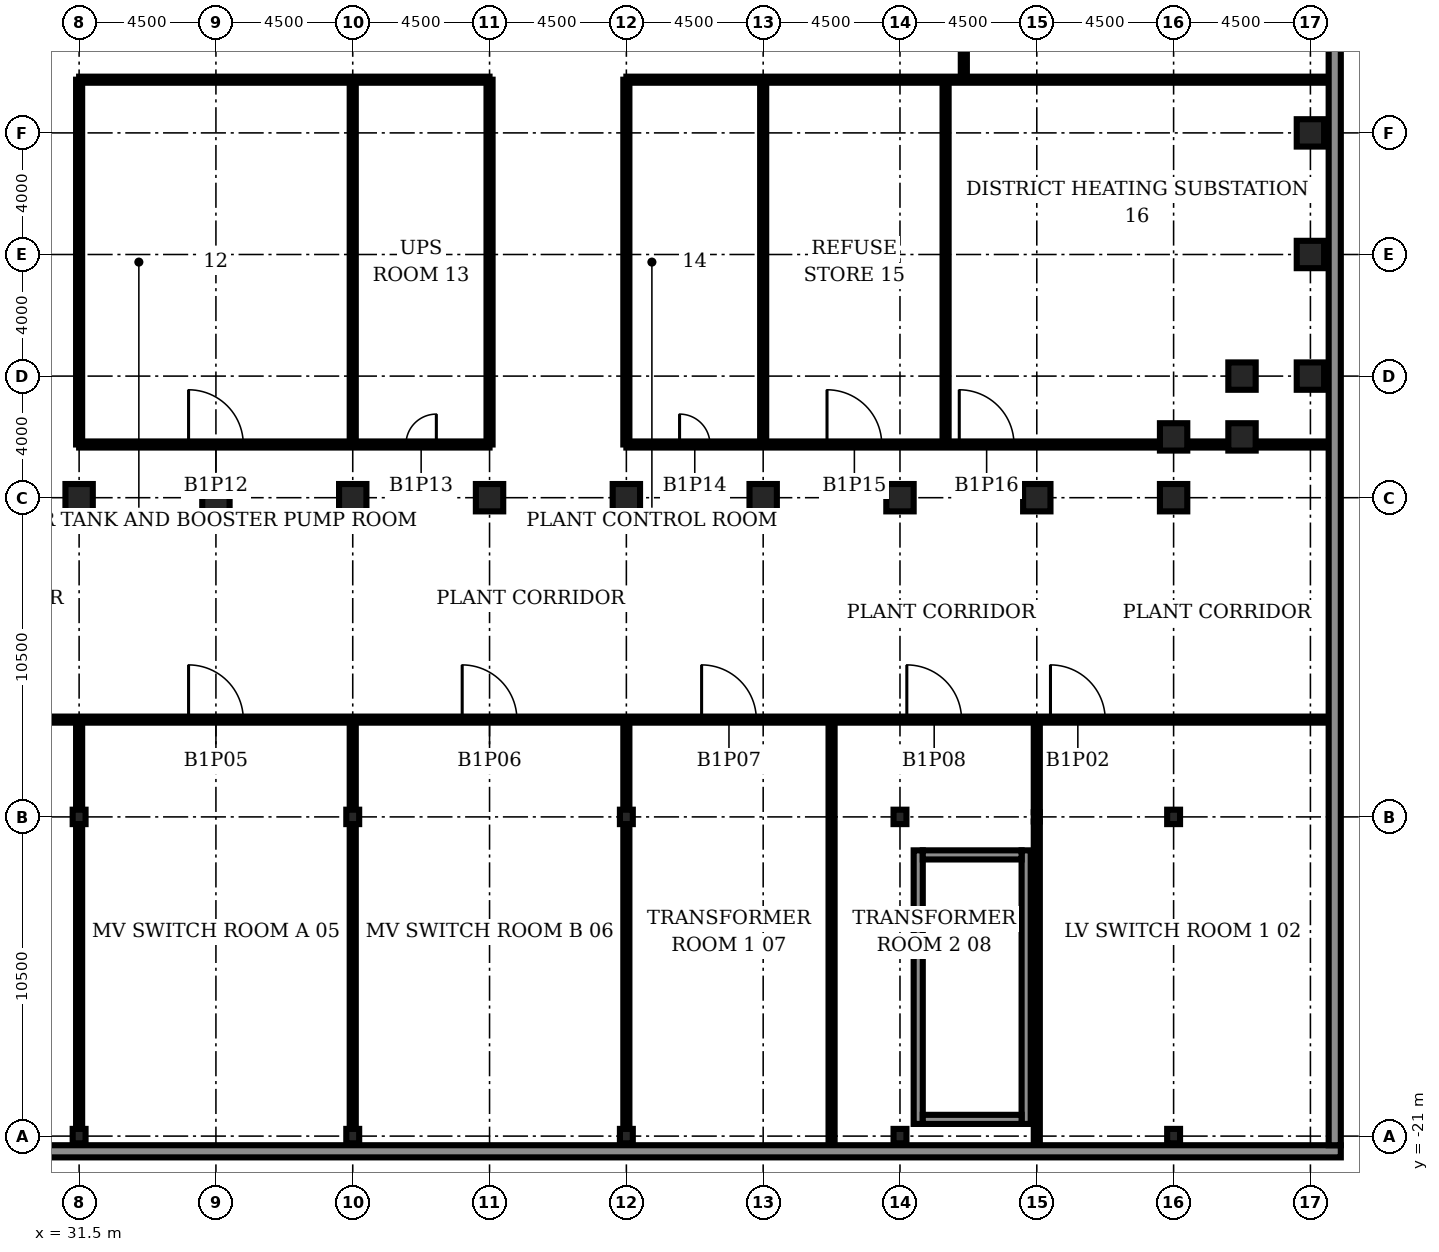
"""IFC4 building model, lengths in metres.
Left out: names, types, materials, properties, quantities, classifications, styles, units other than length and angle.
Written with IfcOpenShell. Run it as: python <this file> out.ifc"""

import sys

from ifc_helpers import new_model, si_unit, direction, frame, frame_2d, origin, origin_2d, place, context, subcontext, project, spatial, rectangle, hollow_rectangle, i_section, extrude, element, fill, save


model = new_model("IFC4")
c1 = context("Model", 3, precision=1e-05, world=origin(), true_north=direction((0.0, 1.0)))
c2 = subcontext(c1, "Body", "Model", "MODEL_VIEW")
j1 = project(units=[si_unit("LENGTHUNIT", "METRE"), si_unit("PLANEANGLEUNIT", "RADIAN")], contexts=[c1])
p1 = place(None, origin())
s1 = spatial("IfcSite", under=j1, at=p1, CompositionType="ELEMENT")
p2 = place(p1, origin())
s2 = spatial("IfcBuilding", under=s1, at=p2, CompositionType="ELEMENT")
p3 = place(p2, frame((0.0, 0.0, -6.0)))
s3 = spatial("IfcBuildingStorey", under=s2, at=p3, CompositionType="ELEMENT", Elevation=-6.0)
for number, where, z_axis, x_axis in (
    (1, (31.5, 0.0, 0.0), (0.0, 0.0, 1.0), (0.0, 1.0, 0.0)),
    (2, (36.0, 0.0, 0.0), (0.0, 0.0, 1.0), (0.0, 1.0, 0.0)),
    (3, (40.5, 0.0, 0.0), (0.0, 0.0, 1.0), (0.0, 1.0, 0.0)),
    (4, (45.0, 0.0, 0.0), (0.0, 0.0, 1.0), (0.0, 1.0, 0.0)),
    (5, (49.5, 0.0, 0.0), (0.0, 0.0, 1.0), (0.0, 1.0, 0.0)),
    (6, (54.0, 0.0, 0.0), (0.0, 0.0, 1.0), (0.0, 1.0, 0.0)),
    (7, (58.5, 0.0, 0.0), (0.0, 0.0, 1.0), (0.0, 1.0, 0.0)),
    (8, (63.0, 0.0, 0.0), (0.0, 0.0, 1.0), (0.0, 1.0, 0.0)),
    (9, (67.5, 0.0, 0.0), (0.0, 0.0, 1.0), (0.0, 1.0, 0.0)),
    (10, (67.5, 2.0, 0.0), (0.0, 0.0, 1.0), (0.0, 1.0, 0.0)),
    (11, (69.75, 2.0, 0.0), (0.0, 0.0, 1.0), (1.0, 0.0, 0.0)),
    (12, (69.75, 4.0, 0.0), (0.0, 0.0, 1.0), (1.0, 0.0, 0.0)),
    (13, (72.0, 4.0, 0.0), (0.0, 0.0, 1.0), (1.0, 0.0, 0.0)),
    (14, (72.0, 8.0, 0.0), (0.0, 0.0, 1.0), (1.0, 0.0, 0.0)),
    (15, (72.0, 12.0, 0.0), (0.0, 0.0, 1.0), (1.0, 0.0, 0.0)),
):
    element("IfcColumn", number, at=place(p3, frame(where, z_axis=z_axis, x_axis=x_axis)), inside=s3, PredefinedType="COLUMN", context=c2, shape_type="SweptSolid", body=[
        extrude(hollow_rectangle(XDim=0.9, YDim=0.9, WallThickness=0.12, at=origin_2d()), origin(), (0.0, 0.0, 1.0), 6.0),
    ])
for number, where, z_axis, x_axis in (
    (16, (31.5, -21.0, 0.0), (0.0, 0.0, 1.0), (1.0, 0.0, 0.0)),
    (17, (31.5, -10.5, 0.0), (0.0, 0.0, 1.0), (1.0, 0.0, 0.0)),
    (18, (40.5, -21.0, 0.0), (0.0, 0.0, 1.0), (1.0, 0.0, 0.0)),
    (19, (40.5, -10.5, 0.0), (0.0, 0.0, 1.0), (1.0, 0.0, 0.0)),
    (20, (49.5, -21.0, 0.0), (0.0, 0.0, 1.0), (1.0, 0.0, 0.0)),
    (21, (49.5, -10.5, 0.0), (0.0, 0.0, 1.0), (1.0, 0.0, 0.0)),
    (22, (58.5, -21.0, 0.0), (0.0, 0.0, 1.0), (1.0, 0.0, 0.0)),
    (23, (58.5, -10.5, 0.0), (0.0, 0.0, 1.0), (1.0, 0.0, 0.0)),
    (24, (67.5, -21.0, 0.0), (0.0, 0.0, 1.0), (1.0, 0.0, 0.0)),
    (25, (67.5, -10.5, 0.0), (0.0, 0.0, 1.0), (1.0, 0.0, 0.0)),
):
    element("IfcColumn", number, at=place(p3, frame(where, z_axis=z_axis, x_axis=x_axis)), inside=s3, PredefinedType="COLUMN", context=c2, shape_type="SweptSolid", body=[
        extrude(i_section(OverallWidth=0.424, OverallDepth=0.474, WebThickness=0.048, FlangeThickness=0.077, at=origin_2d()), origin(), (0.0, 0.0, 1.0), 6.0),
    ])
p4 = place(p3, frame((-0.59, -7.3, 0.0), z_axis=(0.0, 0.0, 1.0), x_axis=(1.0, 0.0, 0.0)))
e26 = element("IfcWall", 26, at=p4, inside=s3, PredefinedType="PARTITIONING", context=c2, shape_type="SweptSolid", body=[
    extrude(rectangle(XDim=73.18, YDim=0.2, at=frame_2d((36.59, 0.0))), origin(), (0.0, 0.0, 1.0), 5.7),
])
p5 = place(p4, frame((11.84, 0.0, 0.0)))
e27 = element("IfcOpeningElement", 27, at=p5, cuts=e26, PredefinedType="OPENING", context=c2, shape_type="SweptSolid", body=[
    extrude(rectangle(XDim=1.8, YDim=2.1, at=frame_2d((0.9, 1.05))), frame((0.0, 0.11, 0.0), z_axis=(0.0, -1.0, 0.0), x_axis=(1.0, 0.0, 0.0)), (0.0, 0.0, 1.0), 0.22),
])
p6 = place(p4, frame((64.04, 0.0, 0.0)))
e28 = element("IfcOpeningElement", 28, at=p6, cuts=e26, PredefinedType="OPENING", context=c2, shape_type="SweptSolid", body=[
    extrude(rectangle(XDim=1.8, YDim=2.1, at=frame_2d((0.9, 1.05))), frame((0.0, 0.11, 0.0), z_axis=(0.0, -1.0, 0.0), x_axis=(1.0, 0.0, 0.0)), (0.0, 0.0, 1.0), 0.22),
])
p7 = place(p4, frame((15.44, 0.0, 0.0)))
e29 = element("IfcOpeningElement", 29, at=p7, cuts=e26, PredefinedType="OPENING", context=c2, shape_type="SweptSolid", body=[
    extrude(rectangle(XDim=1.8, YDim=2.1, at=frame_2d((0.9, 1.05))), frame((0.0, 0.11, 0.0), z_axis=(0.0, -1.0, 0.0), x_axis=(1.0, 0.0, 0.0)), (0.0, 0.0, 1.0), 0.22),
])
p8 = place(p4, frame((19.04, 0.0, 0.0)))
e30 = element("IfcOpeningElement", 30, at=p8, cuts=e26, PredefinedType="OPENING", context=c2, shape_type="SweptSolid", body=[
    extrude(rectangle(XDim=1.8, YDim=2.1, at=frame_2d((0.9, 1.05))), frame((0.0, 0.11, 0.0), z_axis=(0.0, -1.0, 0.0), x_axis=(1.0, 0.0, 0.0)), (0.0, 0.0, 1.0), 0.22),
])
p9 = place(p4, frame((35.69, 0.0, 0.0)))
e31 = element("IfcOpeningElement", 31, at=p9, cuts=e26, PredefinedType="OPENING", context=c2, shape_type="SweptSolid", body=[
    extrude(rectangle(XDim=1.8, YDim=2.1, at=frame_2d((0.9, 1.05))), frame((0.0, 0.11, 0.0), z_axis=(0.0, -1.0, 0.0), x_axis=(1.0, 0.0, 0.0)), (0.0, 0.0, 1.0), 0.22),
])
p10 = place(p4, frame((44.69, 0.0, 0.0)))
e32 = element("IfcOpeningElement", 32, at=p10, cuts=e26, PredefinedType="OPENING", context=c2, shape_type="SweptSolid", body=[
    extrude(rectangle(XDim=1.8, YDim=2.1, at=frame_2d((0.9, 1.05))), frame((0.0, 0.11, 0.0), z_axis=(0.0, -1.0, 0.0), x_axis=(1.0, 0.0, 0.0)), (0.0, 0.0, 1.0), 0.22),
])
p11 = place(p4, frame((52.565, 0.0, 0.0)))
e33 = element("IfcOpeningElement", 33, at=p11, cuts=e26, PredefinedType="OPENING", context=c2, shape_type="SweptSolid", body=[
    extrude(rectangle(XDim=1.8, YDim=2.1, at=frame_2d((0.9, 1.05))), frame((0.0, 0.11, 0.0), z_axis=(0.0, -1.0, 0.0), x_axis=(1.0, 0.0, 0.0)), (0.0, 0.0, 1.0), 0.22),
])
p12 = place(p4, frame((59.315, 0.0, 0.0)))
e34 = element("IfcOpeningElement", 34, at=p12, cuts=e26, PredefinedType="OPENING", context=c2, shape_type="SweptSolid", body=[
    extrude(rectangle(XDim=1.8, YDim=2.1, at=frame_2d((0.9, 1.05))), frame((0.0, 0.11, 0.0), z_axis=(0.0, -1.0, 0.0), x_axis=(1.0, 0.0, 0.0)), (0.0, 0.0, 1.0), 0.22),
])
p13 = place(p3, frame((31.5, 1.75, 0.0), z_axis=(0.0, 0.0, 1.0), x_axis=(1.0, 0.0, 0.0)))
e35 = element("IfcWall", 35, at=p13, inside=s3, PredefinedType="PARTITIONING", context=c2, shape_type="SweptSolid", body=[
    extrude(rectangle(XDim=13.5, YDim=0.2, at=frame_2d((6.75, 0.0))), origin(), (0.0, 0.0, 1.0), 5.7),
])
p14 = place(p13, frame((3.6, 0.0, 0.0)))
e36 = element("IfcOpeningElement", 36, at=p14, cuts=e35, PredefinedType="OPENING", context=c2, shape_type="SweptSolid", body=[
    extrude(rectangle(XDim=1.8, YDim=2.1, at=frame_2d((0.9, 1.05))), frame((0.0, 0.11, 0.0), z_axis=(0.0, -1.0, 0.0), x_axis=(1.0, 0.0, 0.0)), (0.0, 0.0, 1.0), 0.22),
])
p15 = place(p13, frame((10.75, 0.0, 0.0)))
e37 = element("IfcOpeningElement", 37, at=p15, cuts=e35, PredefinedType="OPENING", context=c2, shape_type="SweptSolid", body=[
    extrude(rectangle(XDim=1.0, YDim=2.1, at=frame_2d((0.5, 1.05))), frame((0.0, 0.11, 0.0), z_axis=(0.0, -1.0, 0.0), x_axis=(1.0, 0.0, 0.0)), (0.0, 0.0, 1.0), 0.22),
])
p16 = place(p3, frame((49.5, 1.75, 0.0), z_axis=(0.0, 0.0, 1.0), x_axis=(1.0, 0.0, 0.0)))
e38 = element("IfcWall", 38, at=p16, inside=s3, PredefinedType="PARTITIONING", context=c2, shape_type="SweptSolid", body=[
    extrude(rectangle(XDim=23.09, YDim=0.2, at=frame_2d((11.545, 0.0))), origin(), (0.0, 0.0, 1.0), 5.7),
])
p17 = place(p16, frame((1.75, 0.0, 0.0)))
e39 = element("IfcOpeningElement", 39, at=p17, cuts=e38, PredefinedType="OPENING", context=c2, shape_type="SweptSolid", body=[
    extrude(rectangle(XDim=1.0, YDim=2.1, at=frame_2d((0.5, 1.05))), frame((0.0, 0.11, 0.0), z_axis=(0.0, -1.0, 0.0), x_axis=(1.0, 0.0, 0.0)), (0.0, 0.0, 1.0), 0.22),
])
p18 = place(p16, frame((6.6, 0.0, 0.0)))
e40 = element("IfcOpeningElement", 40, at=p18, cuts=e38, PredefinedType="OPENING", context=c2, shape_type="SweptSolid", body=[
    extrude(rectangle(XDim=1.8, YDim=2.1, at=frame_2d((0.9, 1.05))), frame((0.0, 0.11, 0.0), z_axis=(0.0, -1.0, 0.0), x_axis=(1.0, 0.0, 0.0)), (0.0, 0.0, 1.0), 0.22),
])
p19 = place(p16, frame((10.95, 0.0, 0.0)))
e41 = element("IfcOpeningElement", 41, at=p19, cuts=e38, PredefinedType="OPENING", context=c2, shape_type="SweptSolid", body=[
    extrude(rectangle(XDim=1.8, YDim=2.1, at=frame_2d((0.9, 1.05))), frame((0.0, 0.11, 0.0), z_axis=(0.0, -1.0, 0.0), x_axis=(1.0, 0.0, 0.0)), (0.0, 0.0, 1.0), 0.22),
])
p20 = place(p3, frame((31.5, 13.75, 0.0), z_axis=(0.0, 0.0, 1.0), x_axis=(1.0, 0.0, 0.0)))
e42 = element("IfcWall", 42, at=p20, inside=s3, PredefinedType="PARTITIONING", context=c2, shape_type="SweptSolid", body=[
    extrude(rectangle(XDim=13.5, YDim=0.2, at=frame_2d((6.75, 0.0))), origin(), (0.0, 0.0, 1.0), 5.7),
])
p21 = place(p3, frame((49.5, 13.75, 0.0), z_axis=(0.0, 0.0, 1.0), x_axis=(1.0, 0.0, 0.0)))
e43 = element("IfcWall", 43, at=p21, inside=s3, PredefinedType="PARTITIONING", context=c2, shape_type="SweptSolid", body=[
    extrude(rectangle(XDim=23.09, YDim=0.2, at=frame_2d((11.545, 0.0))), origin(), (0.0, 0.0, 1.0), 5.7),
])
p22 = place(p3, frame((31.5, -21.29, 0.0), z_axis=(0.0, 0.0, 1.0), x_axis=(0.0, 1.0, 0.0)))
e44 = element("IfcWall", 44, at=p22, inside=s3, PredefinedType="PARTITIONING", context=c2, shape_type="SweptSolid", body=[
    extrude(rectangle(XDim=13.99, YDim=0.2, at=frame_2d((6.995, 0.0))), origin(), (0.0, 0.0, 1.0), 4.984),
])
p23 = place(p3, frame((31.5, 1.75, 0.0), z_axis=(0.0, 0.0, 1.0), x_axis=(0.0, 1.0, 0.0)))
e45 = element("IfcWall", 45, at=p23, inside=s3, PredefinedType="PARTITIONING", context=c2, shape_type="SweptSolid", body=[
    extrude(rectangle(XDim=12.0, YDim=0.2, at=frame_2d((6.0, 0.0))), origin(), (0.0, 0.0, 1.0), 5.7),
])
p24 = place(p3, frame((40.5, -21.29, 0.0), z_axis=(0.0, 0.0, 1.0), x_axis=(0.0, 1.0, 0.0)))
e46 = element("IfcWall", 46, at=p24, inside=s3, PredefinedType="PARTITIONING", context=c2, shape_type="SweptSolid", body=[
    extrude(rectangle(XDim=13.99, YDim=0.2, at=frame_2d((6.995, 0.0))), origin(), (0.0, 0.0, 1.0), 4.984),
])
for number, where, z_axis, x_axis in (
    (47, (40.5, 1.75, 0.0), (0.0, 0.0, 1.0), (0.0, 1.0, 0.0)),
    (48, (45.0, 1.75, 0.0), (0.0, 0.0, 1.0), (0.0, 1.0, 0.0)),
):
    element("IfcWall", number, at=place(p3, frame(where, z_axis=z_axis, x_axis=x_axis)), inside=s3, PredefinedType="PARTITIONING", context=c2, shape_type="SweptSolid", body=[
        extrude(rectangle(XDim=12.0, YDim=0.2, at=frame_2d((6.0, 0.0))), origin(), (0.0, 0.0, 1.0), 5.7),
    ])
p25 = place(p3, frame((49.5, -21.29, 0.0), z_axis=(0.0, 0.0, 1.0), x_axis=(0.0, 1.0, 0.0)))
e49 = element("IfcWall", 49, at=p25, inside=s3, PredefinedType="PARTITIONING", context=c2, shape_type="SweptSolid", body=[
    extrude(rectangle(XDim=13.99, YDim=0.2, at=frame_2d((6.995, 0.0))), origin(), (0.0, 0.0, 1.0), 4.984),
])
for number, where, z_axis, x_axis in (
    (50, (49.5, 1.75, 0.0), (0.0, 0.0, 1.0), (0.0, 1.0, 0.0)),
    (51, (54.0, 1.75, 0.0), (0.0, 0.0, 1.0), (0.0, 1.0, 0.0)),
):
    element("IfcWall", number, at=place(p3, frame(where, z_axis=z_axis, x_axis=x_axis)), inside=s3, PredefinedType="PARTITIONING", context=c2, shape_type="SweptSolid", body=[
        extrude(rectangle(XDim=12.0, YDim=0.2, at=frame_2d((6.0, 0.0))), origin(), (0.0, 0.0, 1.0), 5.7),
    ])
p26 = place(p3, frame((56.25, -21.29, 0.0), z_axis=(0.0, 0.0, 1.0), x_axis=(0.0, 1.0, 0.0)))
e52 = element("IfcWall", 52, at=p26, inside=s3, PredefinedType="PARTITIONING", context=c2, shape_type="SweptSolid", body=[
    extrude(rectangle(XDim=13.99, YDim=0.2, at=frame_2d((6.995, 0.0))), origin(), (0.0, 0.0, 1.0), 5.7),
])
p27 = place(p3, frame((60.0, 1.75, 0.0), z_axis=(0.0, 0.0, 1.0), x_axis=(0.0, 1.0, 0.0)))
e53 = element("IfcWall", 53, at=p27, inside=s3, PredefinedType="PARTITIONING", context=c2, shape_type="SweptSolid", body=[
    extrude(rectangle(XDim=12.0, YDim=0.2, at=frame_2d((6.0, 0.0))), origin(), (0.0, 0.0, 1.0), 5.7),
])
p28 = place(p3, frame((60.6, 13.75, 0.0), z_axis=(0.0, 0.0, 1.0), x_axis=(0.0, 1.0, 0.0)))
e54 = element("IfcWall", 54, at=p28, inside=s3, PredefinedType="PARTITIONING", context=c2, shape_type="SweptSolid", body=[
    extrude(rectangle(XDim=32.84, YDim=0.2, at=frame_2d((16.42, 0.0))), origin(), (0.0, 0.0, 1.0), 5.7),
])
p29 = place(p28, frame((7.225, 0.0, 0.0)))
e55 = element("IfcOpeningElement", 55, at=p29, cuts=e54, PredefinedType="OPENING", context=c2, shape_type="SweptSolid", body=[
    extrude(rectangle(XDim=1.8, YDim=2.1, at=frame_2d((0.9, 1.05))), frame((0.0, 0.11, 0.0), z_axis=(0.0, -1.0, 0.0), x_axis=(1.0, 0.0, 0.0)), (0.0, 0.0, 1.0), 0.22),
])
p30 = place(p28, frame((16.7, 0.0, 0.0)))
e56 = element("IfcOpeningElement", 56, at=p30, cuts=e54, PredefinedType="OPENING", context=c2, shape_type="SweptSolid", body=[
    extrude(rectangle(XDim=1.8, YDim=2.1, at=frame_2d((0.9, 1.05))), frame((0.0, 0.11, 0.0), z_axis=(0.0, -1.0, 0.0), x_axis=(1.0, 0.0, 0.0)), (0.0, 0.0, 1.0), 0.22),
])
p31 = place(p3, frame((63.0, -21.29, 0.0), z_axis=(0.0, 0.0, 1.0), x_axis=(0.0, 1.0, 0.0)))
e57 = element("IfcWall", 57, at=p31, inside=s3, PredefinedType="PARTITIONING", context=c2, shape_type="SweptSolid", body=[
    extrude(rectangle(XDim=10.638, YDim=0.2, at=frame_2d((5.319, 0.0))), origin(), (0.0, 0.0, 1.0), 5.2),
])
p32 = place(p3, frame((63.0, -10.652, 0.0), z_axis=(0.0, 0.0, 1.0), x_axis=(0.0, 1.0, 0.0)))
e58 = element("IfcWall", 58, at=p32, inside=s3, PredefinedType="PARTITIONING", context=c2, shape_type="SweptSolid", body=[
    extrude(rectangle(XDim=0.304, YDim=0.2, at=frame_2d((0.152, 0.0))), origin(), (0.0, 0.0, 1.0), 5.7),
])
p33 = place(p3, frame((63.0, -10.348, 0.0), z_axis=(0.0, 0.0, 1.0), x_axis=(0.0, 1.0, 0.0)))
e59 = element("IfcWall", 59, at=p33, inside=s3, PredefinedType="PARTITIONING", context=c2, shape_type="SweptSolid", body=[
    extrude(rectangle(XDim=3.048, YDim=0.2, at=frame_2d((1.524, 0.0))), origin(), (0.0, 0.0, 1.0), 5.2),
])
p34 = place(p3, frame((-1.0, -21.5, 0.0), z_axis=(0.0, 0.0, 1.0), x_axis=(1.0, 0.0, 0.0)))
e60 = element("IfcWall", 60, at=p34, inside=s3, PredefinedType="SOLIDWALL", context=c2, shape_type="SweptSolid", body=[
    extrude(rectangle(XDim=74.0, YDim=0.4, at=frame_2d((37.0, 0.0))), origin(), (0.0, 0.0, 1.0), 5.7),
])
p35 = place(p3, frame((72.8, -21.3, 0.0), z_axis=(0.0, 0.0, 1.0), x_axis=(0.0, 1.0, 0.0)))
e61 = element("IfcWall", 61, at=p35, inside=s3, PredefinedType="SOLIDWALL", context=c2, shape_type="SweptSolid", body=[
    extrude(rectangle(XDim=67.9, YDim=0.4, at=frame_2d((33.95, 0.0))), origin(), (0.0, 0.0, 1.0), 5.7),
])
for number, where, z_axis, x_axis in (
    (62, (59.1, -20.6, 0.0), (0.0, 0.0, 1.0), (0.0, 1.0, 0.0)),
    (63, (62.65, -20.6, 0.0), (0.0, 0.0, 1.0), (0.0, 1.0, 0.0)),
):
    element("IfcWall", number, at=place(p3, frame(where, z_axis=z_axis, x_axis=x_axis)), inside=s3, PredefinedType="SOLIDWALL", context=c2, shape_type="SweptSolid", body=[
        extrude(rectangle(XDim=9.0, YDim=0.3, at=frame_2d((4.5, 0.0))), origin(), (0.0, 0.0, 1.0), 5.7),
    ])
for number, where, z_axis, x_axis in (
    (64, (59.25, -20.45, 0.0), (0.0, 0.0, 1.0), (1.0, 0.0, 0.0)),
    (65, (59.25, -11.75, 0.0), (0.0, 0.0, 1.0), (1.0, 0.0, 0.0)),
):
    element("IfcWall", number, at=place(p3, frame(where, z_axis=z_axis, x_axis=x_axis)), inside=s3, PredefinedType="SOLIDWALL", context=c2, shape_type="SweptSolid", body=[
        extrude(rectangle(XDim=3.25, YDim=0.3, at=frame_2d((1.625, 0.0))), origin(), (0.0, 0.0, 1.0), 5.7),
    ])
p36 = place(p6, origin())
e66 = element("IfcDoor", 66, at=p36, inside=s3, OperationType="SINGLE_SWING_LEFT", PredefinedType="DOOR", context=c2, shape_type="SweptSolid", body=[
    extrude(rectangle(XDim=1.8, YDim=2.1, at=frame_2d((0.9, 1.05))), frame((0.0, 0.025, 0.0), z_axis=(0.0, -1.0, 0.0), x_axis=(1.0, 0.0, 0.0)), (0.0, 0.0, 1.0), 0.05),
])
fill(e28, e66)
p37 = place(p9, origin())
e67 = element("IfcDoor", 67, at=p37, inside=s3, OperationType="SINGLE_SWING_LEFT", PredefinedType="DOOR", context=c2, shape_type="SweptSolid", body=[
    extrude(rectangle(XDim=1.8, YDim=2.1, at=frame_2d((0.9, 1.05))), frame((0.0, 0.025, 0.0), z_axis=(0.0, -1.0, 0.0), x_axis=(1.0, 0.0, 0.0)), (0.0, 0.0, 1.0), 0.05),
])
fill(e31, e67)
p38 = place(p10, origin())
e68 = element("IfcDoor", 68, at=p38, inside=s3, OperationType="SINGLE_SWING_LEFT", PredefinedType="DOOR", context=c2, shape_type="SweptSolid", body=[
    extrude(rectangle(XDim=1.8, YDim=2.1, at=frame_2d((0.9, 1.05))), frame((0.0, 0.025, 0.0), z_axis=(0.0, -1.0, 0.0), x_axis=(1.0, 0.0, 0.0)), (0.0, 0.0, 1.0), 0.05),
])
fill(e32, e68)
p39 = place(p11, origin())
e69 = element("IfcDoor", 69, at=p39, inside=s3, OperationType="SINGLE_SWING_LEFT", PredefinedType="DOOR", context=c2, shape_type="SweptSolid", body=[
    extrude(rectangle(XDim=1.8, YDim=2.1, at=frame_2d((0.9, 1.05))), frame((0.0, 0.025, 0.0), z_axis=(0.0, -1.0, 0.0), x_axis=(1.0, 0.0, 0.0)), (0.0, 0.0, 1.0), 0.05),
])
fill(e33, e69)
p40 = place(p12, origin())
e70 = element("IfcDoor", 70, at=p40, inside=s3, OperationType="SINGLE_SWING_LEFT", PredefinedType="DOOR", context=c2, shape_type="SweptSolid", body=[
    extrude(rectangle(XDim=1.8, YDim=2.1, at=frame_2d((0.9, 1.05))), frame((0.0, 0.025, 0.0), z_axis=(0.0, -1.0, 0.0), x_axis=(1.0, 0.0, 0.0)), (0.0, 0.0, 1.0), 0.05),
])
fill(e34, e70)
p41 = place(p14, origin())
e71 = element("IfcDoor", 71, at=p41, inside=s3, OperationType="SINGLE_SWING_LEFT", PredefinedType="DOOR", context=c2, shape_type="SweptSolid", body=[
    extrude(rectangle(XDim=1.8, YDim=2.1, at=frame_2d((0.9, 1.05))), frame((0.0, 0.025, 0.0), z_axis=(0.0, -1.0, 0.0), x_axis=(1.0, 0.0, 0.0)), (0.0, 0.0, 1.0), 0.05),
])
fill(e36, e71)
p42 = place(p15, origin())
e72 = element("IfcDoor", 72, at=p42, inside=s3, OperationType="SINGLE_SWING_RIGHT", PredefinedType="DOOR", context=c2, shape_type="SweptSolid", body=[
    extrude(rectangle(XDim=1.0, YDim=2.1, at=frame_2d((0.5, 1.05))), frame((0.0, 0.025, 0.0), z_axis=(0.0, -1.0, 0.0), x_axis=(1.0, 0.0, 0.0)), (0.0, 0.0, 1.0), 0.05),
])
fill(e37, e72)
p43 = place(p17, origin())
e73 = element("IfcDoor", 73, at=p43, inside=s3, OperationType="SINGLE_SWING_LEFT", PredefinedType="DOOR", context=c2, shape_type="SweptSolid", body=[
    extrude(rectangle(XDim=1.0, YDim=2.1, at=frame_2d((0.5, 1.05))), frame((0.0, 0.025, 0.0), z_axis=(0.0, -1.0, 0.0), x_axis=(1.0, 0.0, 0.0)), (0.0, 0.0, 1.0), 0.05),
])
fill(e39, e73)
p44 = place(p18, origin())
e74 = element("IfcDoor", 74, at=p44, inside=s3, OperationType="SINGLE_SWING_LEFT", PredefinedType="DOOR", context=c2, shape_type="SweptSolid", body=[
    extrude(rectangle(XDim=1.8, YDim=2.1, at=frame_2d((0.9, 1.05))), frame((0.0, 0.025, 0.0), z_axis=(0.0, -1.0, 0.0), x_axis=(1.0, 0.0, 0.0)), (0.0, 0.0, 1.0), 0.05),
])
fill(e40, e74)
p45 = place(p19, origin())
e75 = element("IfcDoor", 75, at=p45, inside=s3, OperationType="SINGLE_SWING_LEFT", PredefinedType="DOOR", context=c2, shape_type="SweptSolid", body=[
    extrude(rectangle(XDim=1.8, YDim=2.1, at=frame_2d((0.9, 1.05))), frame((0.0, 0.025, 0.0), z_axis=(0.0, -1.0, 0.0), x_axis=(1.0, 0.0, 0.0)), (0.0, 0.0, 1.0), 0.05),
])
fill(e41, e75)
save(model, sys.argv[1])
